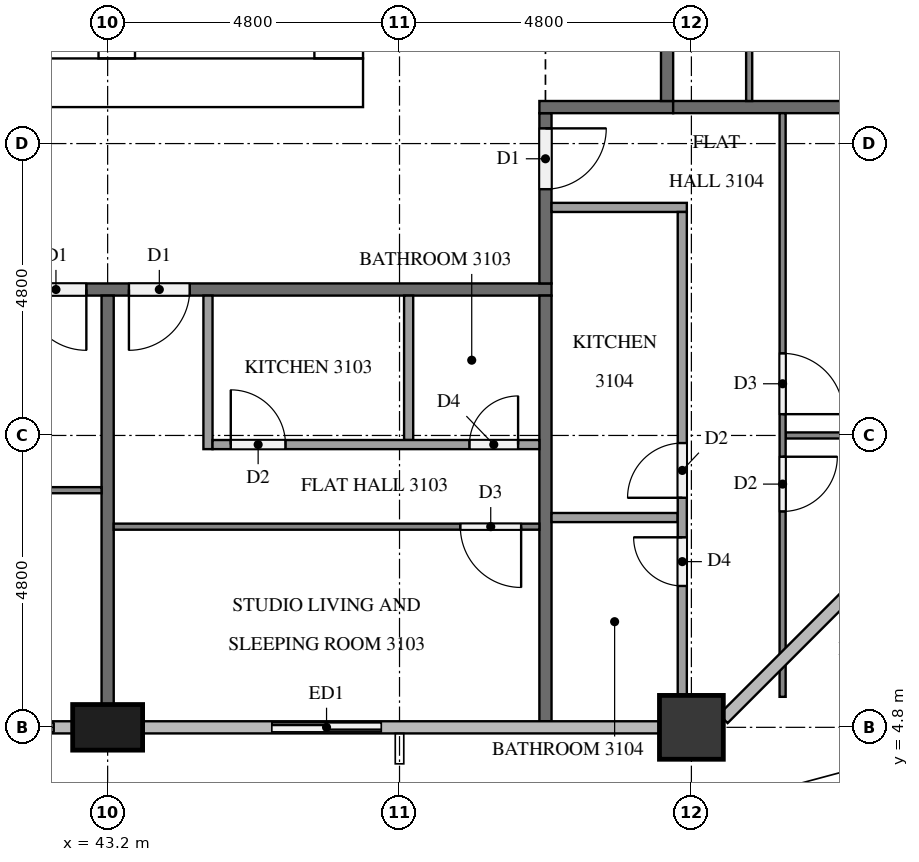
"""IFC4 building model, lengths in metres.
Left out: names, types, materials, properties, quantities, classifications, styles, units other than length and angle.
Written with IfcOpenShell. Run it as: python <this file> out.ifc"""

import sys

from ifc_helpers import new_model, si_unit, direction, frame, frame_2d, origin, origin_2d, place, context, subcontext, project, spatial, rectangle, extrude, element, fill, save


model = new_model("IFC4")
c1 = context("Model", 3, precision=1e-05, world=origin(), true_north=direction((0.0, 1.0)))
c2 = subcontext(c1, "Body", "Model", "MODEL_VIEW")
j1 = project(units=[si_unit("LENGTHUNIT", "METRE"), si_unit("PLANEANGLEUNIT", "RADIAN")], contexts=[c1])
p1 = place(None, origin())
s1 = spatial("IfcSite", under=j1, at=p1, CompositionType="ELEMENT")
p2 = place(p1, origin())
s2 = spatial("IfcBuilding", under=s1, at=p2, CompositionType="ELEMENT")
p3 = place(p2, frame((0.0, 0.0, 122.6)))
s3 = spatial("IfcBuildingStorey", under=s2, at=p3, CompositionType="ELEMENT", Elevation=122.6)
p4 = place(p3, frame((15.0, 15.4, 0.0), z_axis=(0.0, 0.0, 1.0), x_axis=(1.0, 0.0, 0.0)))
e1 = element("IfcWall", 1, at=p4, inside=s3, PredefinedType="SHEAR", context=c2, shape_type="SweptSolid", body=[
    extrude(rectangle(XDim=32.4, YDim=0.8, at=frame_2d((16.2, 0.0))), origin(), (0.0, 0.0, 1.0), 3.2),
])
p5 = place(p4, frame((15.3, 0.0, 0.0)))
e2 = element("IfcOpeningElement", 2, at=p5, cuts=e1, PredefinedType="OPENING", context=c2, shape_type="SweptSolid", body=[
    extrude(rectangle(XDim=1.8, YDim=2.1, at=frame_2d((0.9, 1.05))), frame((0.0, 0.41, 0.0), z_axis=(0.0, -1.0, 0.0), x_axis=(1.0, 0.0, 0.0)), (0.0, 0.0, 1.0), 0.82),
])
p6 = place(p3, frame((47.0, 15.8, 0.0), z_axis=(0.0, 0.0, 1.0), x_axis=(0.0, 1.0, 0.0)))
e3 = element("IfcWall", 3, at=p6, inside=s3, PredefinedType="SHEAR", context=c2, shape_type="SweptSolid", body=[
    extrude(rectangle(XDim=21.2, YDim=0.8, at=frame_2d((10.6, 0.0))), origin(), (0.0, 0.0, 1.0), 3.2),
])
p7 = place(p6, frame((10.3, 0.0, 0.0)))
e4 = element("IfcOpeningElement", 4, at=p7, cuts=e3, PredefinedType="OPENING", context=c2, shape_type="SweptSolid", body=[
    extrude(rectangle(XDim=1.2, YDim=2.1, at=frame_2d((0.6, 1.05))), frame((0.0, 0.41, 0.0), z_axis=(0.0, -1.0, 0.0), x_axis=(1.0, 0.0, 0.0)), (0.0, 0.0, 1.0), 0.82),
])
p8 = place(p3, frame((43.35, 15.8, 0.0), z_axis=(0.0, 0.0, 1.0), x_axis=(0.0, 1.0, 0.0)))
e5 = element("IfcWall", 5, at=p8, inside=s3, PredefinedType="SHEAR", context=c2, shape_type="SweptSolid", body=[
    extrude(rectangle(XDim=8.45, YDim=0.6, at=frame_2d((4.225, 0.0))), origin(), (0.0, 0.0, 1.0), 3.2),
])
p9 = place(p8, frame((0.4, 0.0, 0.0)))
e6 = element("IfcOpeningElement", 6, at=p9, cuts=e5, PredefinedType="OPENING", context=c2, shape_type="SweptSolid", body=[
    extrude(rectangle(XDim=1.2, YDim=2.1, at=frame_2d((0.6, 1.05))), frame((0.0, 0.31, 0.0), z_axis=(0.0, -1.0, 0.0), x_axis=(1.0, 0.0, 0.0)), (0.0, 0.0, 1.0), 0.62),
])
p10 = place(p3, frame((43.2, 4.8, 0.0), z_axis=(0.0, 0.0, 1.0), x_axis=(1.0, 0.0, 0.0)))
e7 = element("IfcColumn", 7, at=p10, inside=s3, PredefinedType="COLUMN", context=c2, shape_type="SweptSolid", body=[
    extrude(rectangle(XDim=1.15, YDim=0.75, at=origin_2d()), origin(), (0.0, 0.0, 1.0), 3.2),
])
p11 = place(p3, frame((52.8, 4.8, 0.0), z_axis=(0.0, 0.0, 1.0), x_axis=(1.0, 0.0, 0.0)))
e8 = element("IfcColumn", 8, at=p11, inside=s3, PredefinedType="COLUMN", context=c2, shape_type="SweptSolid", body=[
    extrude(rectangle(XDim=1.05, YDim=1.05, at=origin_2d()), origin(), (0.0, 0.0, 1.0), 3.2),
])
p12 = place(p3, frame((40.8, 4.8, 0.0), z_axis=(0.0, 0.0, 1.0), x_axis=(1.0, 0.0, 0.0)))
e9 = element("IfcWall", 9, at=p12, inside=s3, PredefinedType="SOLIDWALL", context=c2, shape_type="SweptSolid", body=[
    extrude(rectangle(XDim=1.825, YDim=0.15, at=frame_2d((0.913, 0.0))), origin(), (0.0, 0.0, 1.0), 3.2),
])
p13 = place(p12, frame((0.312, 0.0, 0.9)))
e10 = element("IfcOpeningElement", 10, at=p13, cuts=e9, PredefinedType="OPENING", context=c2, shape_type="SweptSolid", body=[
    extrude(rectangle(XDim=1.2, YDim=1.4, at=frame_2d((0.6, 0.7))), frame((0.0, 0.085, 0.0), z_axis=(0.0, -1.0, 0.0), x_axis=(1.0, 0.0, 0.0)), (0.0, 0.0, 1.0), 0.17),
])
p14 = place(p3, frame((45.6, 4.8, 0.0), z_axis=(0.0, 0.0, 1.0), x_axis=(1.0, 0.0, 0.0)))
e11 = element("IfcWall", 11, at=p14, inside=s3, PredefinedType="SOLIDWALL", context=c2, shape_type="SweptSolid", body=[
    extrude(rectangle(XDim=2.4, YDim=0.15, at=frame_2d((1.2, 0.0))), origin(), (0.0, 0.0, 1.0), 3.2),
])
p15 = place(p14, frame((0.3, 0.0, 0.0)))
e12 = element("IfcOpeningElement", 12, at=p15, cuts=e11, PredefinedType="OPENING", context=c2, shape_type="SweptSolid", body=[
    extrude(rectangle(XDim=1.8, YDim=2.4, at=frame_2d((0.9, 1.2))), frame((0.0, 0.085, 0.0), z_axis=(0.0, -1.0, 0.0), x_axis=(1.0, 0.0, 0.0)), (0.0, 0.0, 1.0), 0.17),
])
p16 = place(p3, frame((50.5, 12.0, 0.0), z_axis=(0.0, 0.0, 1.0), x_axis=(-1.0, 0.0, 0.0)))
e13 = element("IfcWall", 13, at=p16, inside=s3, PredefinedType="PARTITIONING", context=c2, shape_type="SweptSolid", body=[
    extrude(rectangle(XDim=38.6, YDim=0.2, at=frame_2d((19.3, 0.0))), origin(), (0.0, 0.0, 1.0), 3.2),
])
p17 = place(p16, frame((37.15, 0.0, 0.0)))
e14 = element("IfcOpeningElement", 14, at=p17, cuts=e13, PredefinedType="OPENING", context=c2, shape_type="SweptSolid", body=[
    extrude(rectangle(XDim=1.0, YDim=2.1, at=frame_2d((0.5, 1.05))), frame((0.0, 0.11, 0.0), z_axis=(0.0, -1.0, 0.0), x_axis=(1.0, 0.0, 0.0)), (0.0, 0.0, 1.0), 0.22),
])
p18 = place(p16, frame((7.65, 0.0, 0.0)))
e15 = element("IfcOpeningElement", 15, at=p18, cuts=e13, PredefinedType="OPENING", context=c2, shape_type="SweptSolid", body=[
    extrude(rectangle(XDim=1.0, YDim=2.1, at=frame_2d((0.5, 1.05))), frame((0.0, 0.11, 0.0), z_axis=(0.0, -1.0, 0.0), x_axis=(1.0, 0.0, 0.0)), (0.0, 0.0, 1.0), 0.22),
])
p19 = place(p16, frame((5.95, 0.0, 0.0)))
e16 = element("IfcOpeningElement", 16, at=p19, cuts=e13, PredefinedType="OPENING", context=c2, shape_type="SweptSolid", body=[
    extrude(rectangle(XDim=1.0, YDim=2.1, at=frame_2d((0.5, 1.05))), frame((0.0, 0.11, 0.0), z_axis=(0.0, -1.0, 0.0), x_axis=(1.0, 0.0, 0.0)), (0.0, 0.0, 1.0), 0.22),
])
p20 = place(p3, frame((50.4, 14.9, 0.0), z_axis=(0.0, 0.0, 1.0), x_axis=(0.0, -1.0, 0.0)))
e17 = element("IfcWall", 17, at=p20, inside=s3, PredefinedType="PARTITIONING", context=c2, shape_type="SweptSolid", body=[
    extrude(rectangle(XDim=2.8, YDim=0.2, at=frame_2d((1.4, 0.0))), origin(), (0.0, 0.0, 1.0), 3.2),
])
p21 = place(p20, frame((0.25, 0.0, 0.0)))
e18 = element("IfcOpeningElement", 18, at=p21, cuts=e17, PredefinedType="OPENING", context=c2, shape_type="SweptSolid", body=[
    extrude(rectangle(XDim=1.0, YDim=2.1, at=frame_2d((0.5, 1.05))), frame((0.0, 0.11, 0.0), z_axis=(0.0, -1.0, 0.0), x_axis=(1.0, 0.0, 0.0)), (0.0, 0.0, 1.0), 0.22),
])
p22 = place(p3, frame((50.3, 15.0, 0.0), z_axis=(0.0, 0.0, 1.0), x_axis=(1.0, 0.0, 0.0)))
e19 = element("IfcWall", 19, at=p22, inside=s3, PredefinedType="PARTITIONING", context=c2, shape_type="SweptSolid", body=[
    extrude(rectangle(XDim=2.2, YDim=0.2, at=frame_2d((1.1, 0.0))), origin(), (0.0, 0.0, 1.0), 3.2),
])
p23 = place(p3, frame((52.4, 37.7, 0.0), z_axis=(0.0, 0.0, 1.0), x_axis=(0.0, -1.0, 0.0)))
e20 = element("IfcWall", 20, at=p23, inside=s3, PredefinedType="PARTITIONING", context=c2, shape_type="SweptSolid", body=[
    extrude(rectangle(XDim=22.6, YDim=0.2, at=frame_2d((11.3, 0.0))), origin(), (0.0, 0.0, 1.0), 3.2),
])
p24 = place(p23, frame((0.25, 0.0, 0.0)))
e21 = element("IfcOpeningElement", 21, at=p24, cuts=e20, PredefinedType="OPENING", context=c2, shape_type="SweptSolid", body=[
    extrude(rectangle(XDim=1.0, YDim=2.1, at=frame_2d((0.5, 1.05))), frame((0.0, 0.11, 0.0), z_axis=(0.0, -1.0, 0.0), x_axis=(1.0, 0.0, 0.0)), (0.0, 0.0, 1.0), 0.22),
])
p25 = place(p3, frame((43.2, 11.9, 0.0), z_axis=(0.0, 0.0, 1.0), x_axis=(0.0, -1.0, 0.0)))
e22 = element("IfcWall", 22, at=p25, inside=s3, PredefinedType="PARTITIONING", context=c2, shape_type="SweptSolid", body=[
    extrude(rectangle(XDim=6.725, YDim=0.2, at=frame_2d((3.362, 0.0))), origin(), (0.0, 0.0, 1.0), 3.2),
])
p26 = place(p3, frame((50.4, 11.9, 0.0), z_axis=(0.0, 0.0, 1.0), x_axis=(0.0, -1.0, 0.0)))
e23 = element("IfcWall", 23, at=p26, inside=s3, PredefinedType="PARTITIONING", context=c2, shape_type="SweptSolid", body=[
    extrude(rectangle(XDim=7.0, YDim=0.2, at=frame_2d((3.5, 0.0))), origin(), (0.0, 0.0, 1.0), 3.2),
])
p27 = place(p3, frame((52.5, 15.0, 0.0), z_axis=(0.0, 0.0, 1.0), x_axis=(1.0, 0.0, 0.0)))
e24 = element("IfcWall", 24, at=p27, inside=s3, PredefinedType="PARTITIONING", context=c2, shape_type="SweptSolid", body=[
    extrude(rectangle(XDim=5.0, YDim=0.2, at=frame_2d((2.5, 0.0))), origin(), (0.0, 0.0, 1.0), 3.2),
])
p28 = place(p3, frame((43.1, 8.7, 0.0), z_axis=(0.0, 0.0, 1.0), x_axis=(-1.0, 0.0, 0.0)))
e25 = element("IfcWall", 25, at=p28, inside=s3, PredefinedType="PARTITIONING", context=c2, shape_type="SweptSolid", body=[
    extrude(rectangle(XDim=16.6, YDim=0.1, at=frame_2d((8.3, 0.0))), origin(), (0.0, 0.0, 1.0), 3.2),
])
p29 = place(p28, frame((3.45, 0.0, 0.0)))
e26 = element("IfcOpeningElement", 26, at=p29, cuts=e25, PredefinedType="OPENING", context=c2, shape_type="SweptSolid", body=[
    extrude(rectangle(XDim=0.9, YDim=2.1, at=frame_2d((0.45, 1.05))), frame((0.0, 0.06, 0.0), z_axis=(0.0, -1.0, 0.0), x_axis=(1.0, 0.0, 0.0)), (0.0, 0.0, 1.0), 0.12),
])
p30 = place(p28, frame((5.05, 0.0, 0.0)))
e27 = element("IfcOpeningElement", 27, at=p30, cuts=e25, PredefinedType="OPENING", context=c2, shape_type="SweptSolid", body=[
    extrude(rectangle(XDim=1.0, YDim=2.1, at=frame_2d((0.5, 1.05))), frame((0.0, 0.06, 0.0), z_axis=(0.0, -1.0, 0.0), x_axis=(1.0, 0.0, 0.0)), (0.0, 0.0, 1.0), 0.12),
])
p31 = place(p28, frame((15.4, 0.0, 0.0)))
e28 = element("IfcOpeningElement", 28, at=p31, cuts=e25, PredefinedType="OPENING", context=c2, shape_type="SweptSolid", body=[
    extrude(rectangle(XDim=0.9, YDim=2.1, at=frame_2d((0.45, 1.05))), frame((0.0, 0.06, 0.0), z_axis=(0.0, -1.0, 0.0), x_axis=(1.0, 0.0, 0.0)), (0.0, 0.0, 1.0), 0.12),
])
p32 = place(p3, frame((50.3, 8.1, 0.0), z_axis=(0.0, 0.0, 1.0), x_axis=(-1.0, 0.0, 0.0)))
e29 = element("IfcWall", 29, at=p32, inside=s3, PredefinedType="PARTITIONING", context=c2, shape_type="SweptSolid", body=[
    extrude(rectangle(XDim=7.0, YDim=0.1, at=frame_2d((3.5, 0.0))), origin(), (0.0, 0.0, 1.0), 3.2),
])
p33 = place(p32, frame((0.3, 0.0, 0.0)))
e30 = element("IfcOpeningElement", 30, at=p33, cuts=e29, PredefinedType="OPENING", context=c2, shape_type="SweptSolid", body=[
    extrude(rectangle(XDim=1.0, YDim=2.1, at=frame_2d((0.5, 1.05))), frame((0.0, 0.06, 0.0), z_axis=(0.0, -1.0, 0.0), x_axis=(1.0, 0.0, 0.0)), (0.0, 0.0, 1.0), 0.12),
])
p34 = place(p3, frame((48.15, 11.9, 0.0), z_axis=(0.0, 0.0, 1.0), x_axis=(0.0, -1.0, 0.0)))
e31 = element("IfcWall", 31, at=p34, inside=s3, PredefinedType="PARTITIONING", context=c2, shape_type="SweptSolid", body=[
    extrude(rectangle(XDim=2.375, YDim=0.15, at=frame_2d((1.188, 0.0))), origin(), (0.0, 0.0, 1.0), 3.2),
])
p35 = place(p3, frame((44.85, 11.9, 0.0), z_axis=(0.0, 0.0, 1.0), x_axis=(0.0, -1.0, 0.0)))
e32 = element("IfcWall", 32, at=p35, inside=s3, PredefinedType="PARTITIONING", context=c2, shape_type="SweptSolid", body=[
    extrude(rectangle(XDim=2.525, YDim=0.15, at=frame_2d((1.262, 0.0))), origin(), (0.0, 0.0, 1.0), 3.2),
])
p36 = place(p3, frame((44.925, 9.45, 0.0), z_axis=(0.0, 0.0, 1.0), x_axis=(1.0, 0.0, 0.0)))
e33 = element("IfcWall", 33, at=p36, inside=s3, PredefinedType="PARTITIONING", context=c2, shape_type="SweptSolid", body=[
    extrude(rectangle(XDim=5.375, YDim=0.15, at=frame_2d((2.688, 0.0))), origin(), (0.0, 0.0, 1.0), 3.2),
])
p37 = place(p36, frame((0.3, 0.0, 0.0)))
e34 = element("IfcOpeningElement", 34, at=p37, cuts=e33, PredefinedType="OPENING", context=c2, shape_type="SweptSolid", body=[
    extrude(rectangle(XDim=0.9, YDim=2.1, at=frame_2d((0.45, 1.05))), frame((0.0, 0.085, 0.0), z_axis=(0.0, -1.0, 0.0), x_axis=(1.0, 0.0, 0.0)), (0.0, 0.0, 1.0), 0.17),
])
p38 = place(p36, frame((4.225, 0.0, 0.0)))
e35 = element("IfcOpeningElement", 35, at=p38, cuts=e33, PredefinedType="OPENING", context=c2, shape_type="SweptSolid", body=[
    extrude(rectangle(XDim=0.8, YDim=2.1, at=frame_2d((0.4, 1.05))), frame((0.0, 0.085, 0.0), z_axis=(0.0, -1.0, 0.0), x_axis=(1.0, 0.0, 0.0)), (0.0, 0.0, 1.0), 0.17),
])
p39 = place(p3, frame((54.35, 9.6, 0.0), z_axis=(0.0, 0.0, 1.0), x_axis=(1.0, 0.0, 0.0)))
e36 = element("IfcWall", 36, at=p39, inside=s3, PredefinedType="PARTITIONING", context=c2, shape_type="SweptSolid", body=[
    extrude(rectangle(XDim=2.725, YDim=0.1, at=frame_2d((1.362, 0.0))), origin(), (0.0, 0.0, 1.0), 3.2),
])
p40 = place(p3, frame((54.3, 14.9, 0.0), z_axis=(0.0, 0.0, 1.0), x_axis=(0.0, -1.0, 0.0)))
e37 = element("IfcWall", 37, at=p40, inside=s3, PredefinedType="PARTITIONING", context=c2, shape_type="SweptSolid", body=[
    extrude(rectangle(XDim=9.598, YDim=0.1, at=frame_2d((4.799, 0.0))), origin(), (0.0, 0.0, 1.0), 3.2),
])
p41 = place(p40, frame((3.95, 0.0, 0.0)))
e38 = element("IfcOpeningElement", 38, at=p41, cuts=e37, PredefinedType="OPENING", context=c2, shape_type="SweptSolid", body=[
    extrude(rectangle(XDim=1.0, YDim=2.1, at=frame_2d((0.5, 1.05))), frame((0.0, 0.06, 0.0), z_axis=(0.0, -1.0, 0.0), x_axis=(1.0, 0.0, 0.0)), (0.0, 0.0, 1.0), 0.12),
])
p42 = place(p40, frame((5.65, 0.0, 0.0)))
e39 = element("IfcOpeningElement", 39, at=p42, cuts=e37, PredefinedType="OPENING", context=c2, shape_type="SweptSolid", body=[
    extrude(rectangle(XDim=0.9, YDim=2.1, at=frame_2d((0.45, 1.05))), frame((0.0, 0.06, 0.0), z_axis=(0.0, -1.0, 0.0), x_axis=(1.0, 0.0, 0.0)), (0.0, 0.0, 1.0), 0.12),
])
p43 = place(p3, frame((50.5, 8.25, 0.0), z_axis=(0.0, 0.0, 1.0), x_axis=(1.0, 0.0, 0.0)))
e40 = element("IfcWall", 40, at=p43, inside=s3, PredefinedType="PARTITIONING", context=c2, shape_type="SweptSolid", body=[
    extrude(rectangle(XDim=2.075, YDim=0.15, at=frame_2d((1.038, 0.0))), origin(), (0.0, 0.0, 1.0), 3.2),
])
p44 = place(p3, frame((50.5, 13.35, 0.0), z_axis=(0.0, 0.0, 1.0), x_axis=(1.0, 0.0, 0.0)))
e41 = element("IfcWall", 41, at=p44, inside=s3, PredefinedType="PARTITIONING", context=c2, shape_type="SweptSolid", body=[
    extrude(rectangle(XDim=2.225, YDim=0.15, at=frame_2d((1.113, 0.0))), origin(), (0.0, 0.0, 1.0), 3.2),
])
p45 = place(p3, frame((52.65, 5.325, 0.0), z_axis=(0.0, 0.0, 1.0), x_axis=(0.0, 1.0, 0.0)))
e42 = element("IfcWall", 42, at=p45, inside=s3, PredefinedType="PARTITIONING", context=c2, shape_type="SweptSolid", body=[
    extrude(rectangle(XDim=7.95, YDim=0.15, at=frame_2d((3.975, 0.0))), origin(), (0.0, 0.0, 1.0), 3.2),
])
p46 = place(p45, frame((3.25, 0.0, 0.0)))
e43 = element("IfcOpeningElement", 43, at=p46, cuts=e42, PredefinedType="OPENING", context=c2, shape_type="SweptSolid", body=[
    extrude(rectangle(XDim=0.9, YDim=2.1, at=frame_2d((0.45, 1.05))), frame((0.0, 0.085, 0.0), z_axis=(0.0, -1.0, 0.0), x_axis=(1.0, 0.0, 0.0)), (0.0, 0.0, 1.0), 0.17),
])
p47 = place(p45, frame((1.8, 0.0, 0.0)))
e44 = element("IfcOpeningElement", 44, at=p47, cuts=e42, PredefinedType="OPENING", context=c2, shape_type="SweptSolid", body=[
    extrude(rectangle(XDim=0.8, YDim=2.1, at=frame_2d((0.4, 1.05))), frame((0.0, 0.085, 0.0), z_axis=(0.0, -1.0, 0.0), x_axis=(1.0, 0.0, 0.0)), (0.0, 0.0, 1.0), 0.17),
])
p48 = place(p3, frame((53.75, 37.7, 0.0), z_axis=(0.0, 0.0, 1.0), x_axis=(0.0, -1.0, 0.0)))
e45 = element("IfcWall", 45, at=p48, inside=s3, PredefinedType="PARTITIONING", context=c2, shape_type="SweptSolid", body=[
    extrude(rectangle(XDim=22.6, YDim=0.1, at=frame_2d((11.3, 0.0))), origin(), (0.0, 0.0, 1.0), 3.2),
])
p49 = place(p48, frame((2.85, 0.0, 0.0)))
e46 = element("IfcOpeningElement", 46, at=p49, cuts=e45, PredefinedType="OPENING", context=c2, shape_type="SweptSolid", body=[
    extrude(rectangle(XDim=0.9, YDim=2.1, at=frame_2d((0.45, 1.05))), frame((0.0, 0.06, 0.0), z_axis=(0.0, -1.0, 0.0), x_axis=(1.0, 0.0, 0.0)), (0.0, 0.0, 1.0), 0.12),
])
p50 = place(p48, frame((4.45, 0.0, 0.0)))
e47 = element("IfcOpeningElement", 47, at=p50, cuts=e45, PredefinedType="OPENING", context=c2, shape_type="SweptSolid", body=[
    extrude(rectangle(XDim=0.8, YDim=2.1, at=frame_2d((0.4, 1.05))), frame((0.0, 0.06, 0.0), z_axis=(0.0, -1.0, 0.0), x_axis=(1.0, 0.0, 0.0)), (0.0, 0.0, 1.0), 0.12),
])
p51 = place(p48, frame((7.65, 0.0, 0.0)))
e48 = element("IfcOpeningElement", 48, at=p51, cuts=e45, PredefinedType="OPENING", context=c2, shape_type="SweptSolid", body=[
    extrude(rectangle(XDim=0.9, YDim=2.1, at=frame_2d((0.45, 1.05))), frame((0.0, 0.06, 0.0), z_axis=(0.0, -1.0, 0.0), x_axis=(1.0, 0.0, 0.0)), (0.0, 0.0, 1.0), 0.12),
])
p52 = place(p48, frame((9.25, 0.0, 0.0)))
e49 = element("IfcOpeningElement", 49, at=p52, cuts=e45, PredefinedType="OPENING", context=c2, shape_type="SweptSolid", body=[
    extrude(rectangle(XDim=0.9, YDim=2.1, at=frame_2d((0.45, 1.05))), frame((0.0, 0.06, 0.0), z_axis=(0.0, -1.0, 0.0), x_axis=(1.0, 0.0, 0.0)), (0.0, 0.0, 1.0), 0.12),
])
p53 = place(p48, frame((17.15, 0.0, 0.0)))
e50 = element("IfcOpeningElement", 50, at=p53, cuts=e45, PredefinedType="OPENING", context=c2, shape_type="SweptSolid", body=[
    extrude(rectangle(XDim=1.0, YDim=2.1, at=frame_2d((0.5, 1.05))), frame((0.0, 0.06, 0.0), z_axis=(0.0, -1.0, 0.0), x_axis=(1.0, 0.0, 0.0)), (0.0, 0.0, 1.0), 0.12),
])
p54 = place(p48, frame((18.85, 0.0, 0.0)))
e51 = element("IfcOpeningElement", 51, at=p54, cuts=e45, PredefinedType="OPENING", context=c2, shape_type="SweptSolid", body=[
    extrude(rectangle(XDim=0.9, YDim=2.1, at=frame_2d((0.45, 1.05))), frame((0.0, 0.06, 0.0), z_axis=(0.0, -1.0, 0.0), x_axis=(1.0, 0.0, 0.0)), (0.0, 0.0, 1.0), 0.12),
])
p55 = place(p13, origin())
e52 = element("IfcWindow", 52, at=p55, inside=s3, PartitioningType="SINGLE_PANEL", PredefinedType="WINDOW", context=c2, shape_type="SweptSolid", body=[
    extrude(rectangle(XDim=1.2, YDim=1.4, at=frame_2d((0.6, 0.7))), frame((0.0, 0.03, 0.0), z_axis=(0.0, -1.0, 0.0), x_axis=(1.0, 0.0, 0.0)), (0.0, 0.0, 1.0), 0.06),
])
fill(e10, e52)
p56 = place(p15, origin())
e53 = element("IfcDoor", 53, at=p56, inside=s3, OperationType="SLIDING_TO_RIGHT", PredefinedType="DOOR", context=c2, shape_type="SweptSolid", body=[
    extrude(rectangle(XDim=1.8, YDim=2.4, at=frame_2d((0.9, 1.2))), frame((0.0, 0.025, 0.0), z_axis=(0.0, -1.0, 0.0), x_axis=(1.0, 0.0, 0.0)), (0.0, 0.0, 1.0), 0.05),
])
fill(e12, e53)
p57 = place(p18, origin())
e54 = element("IfcDoor", 54, at=p57, inside=s3, OperationType="SINGLE_SWING_LEFT", PredefinedType="DOOR", context=c2, shape_type="SweptSolid", body=[
    extrude(rectangle(XDim=1.0, YDim=2.1, at=frame_2d((0.5, 1.05))), frame((0.0, 0.025, 0.0), z_axis=(0.0, -1.0, 0.0), x_axis=(1.0, 0.0, 0.0)), (0.0, 0.0, 1.0), 0.05),
])
fill(e15, e54)
p58 = place(p19, origin())
e55 = element("IfcDoor", 55, at=p58, inside=s3, OperationType="SINGLE_SWING_RIGHT", PredefinedType="DOOR", context=c2, shape_type="SweptSolid", body=[
    extrude(rectangle(XDim=1.0, YDim=2.1, at=frame_2d((0.5, 1.05))), frame((0.0, 0.025, 0.0), z_axis=(0.0, -1.0, 0.0), x_axis=(1.0, 0.0, 0.0)), (0.0, 0.0, 1.0), 0.05),
])
fill(e16, e55)
p59 = place(p21, origin())
e56 = element("IfcDoor", 56, at=p59, inside=s3, OperationType="SINGLE_SWING_LEFT", PredefinedType="DOOR", context=c2, shape_type="SweptSolid", body=[
    extrude(rectangle(XDim=1.0, YDim=2.1, at=frame_2d((0.5, 1.05))), frame((0.0, 0.025, 0.0), z_axis=(0.0, -1.0, 0.0), x_axis=(1.0, 0.0, 0.0)), (0.0, 0.0, 1.0), 0.05),
])
fill(e18, e56)
p60 = place(p33, origin())
e57 = element("IfcDoor", 57, at=p60, inside=s3, OperationType="SINGLE_SWING_LEFT", PredefinedType="DOOR", context=c2, shape_type="SweptSolid", body=[
    extrude(rectangle(XDim=1.0, YDim=2.1, at=frame_2d((0.5, 1.05))), frame((0.0, 0.025, 0.0), z_axis=(0.0, -1.0, 0.0), x_axis=(1.0, 0.0, 0.0)), (0.0, 0.0, 1.0), 0.05),
])
fill(e30, e57)
p61 = place(p37, origin())
e58 = element("IfcDoor", 58, at=p61, inside=s3, OperationType="SINGLE_SWING_LEFT", PredefinedType="DOOR", context=c2, shape_type="SweptSolid", body=[
    extrude(rectangle(XDim=0.9, YDim=2.1, at=frame_2d((0.45, 1.05))), frame((0.0, 0.025, 0.0), z_axis=(0.0, -1.0, 0.0), x_axis=(1.0, 0.0, 0.0)), (0.0, 0.0, 1.0), 0.05),
])
fill(e34, e58)
p62 = place(p38, origin())
e59 = element("IfcDoor", 59, at=p62, inside=s3, OperationType="SINGLE_SWING_RIGHT", PredefinedType="DOOR", context=c2, shape_type="SweptSolid", body=[
    extrude(rectangle(XDim=0.8, YDim=2.1, at=frame_2d((0.4, 1.05))), frame((0.0, 0.025, 0.0), z_axis=(0.0, -1.0, 0.0), x_axis=(1.0, 0.0, 0.0)), (0.0, 0.0, 1.0), 0.05),
])
fill(e35, e59)
p63 = place(p41, origin())
e60 = element("IfcDoor", 60, at=p63, inside=s3, OperationType="SINGLE_SWING_RIGHT", PredefinedType="DOOR", context=c2, shape_type="SweptSolid", body=[
    extrude(rectangle(XDim=1.0, YDim=2.1, at=frame_2d((0.5, 1.05))), frame((0.0, 0.025, 0.0), z_axis=(0.0, -1.0, 0.0), x_axis=(1.0, 0.0, 0.0)), (0.0, 0.0, 1.0), 0.05),
])
fill(e38, e60)
p64 = place(p42, origin())
e61 = element("IfcDoor", 61, at=p64, inside=s3, OperationType="SINGLE_SWING_LEFT", PredefinedType="DOOR", context=c2, shape_type="SweptSolid", body=[
    extrude(rectangle(XDim=0.9, YDim=2.1, at=frame_2d((0.45, 1.05))), frame((0.0, 0.025, 0.0), z_axis=(0.0, -1.0, 0.0), x_axis=(1.0, 0.0, 0.0)), (0.0, 0.0, 1.0), 0.05),
])
fill(e39, e61)
p65 = place(p46, origin())
e62 = element("IfcDoor", 62, at=p65, inside=s3, OperationType="SINGLE_SWING_LEFT", PredefinedType="DOOR", context=c2, shape_type="SweptSolid", body=[
    extrude(rectangle(XDim=0.9, YDim=2.1, at=frame_2d((0.45, 1.05))), frame((0.0, 0.025, 0.0), z_axis=(0.0, -1.0, 0.0), x_axis=(1.0, 0.0, 0.0)), (0.0, 0.0, 1.0), 0.05),
])
fill(e43, e62)
p66 = place(p47, origin())
e63 = element("IfcDoor", 63, at=p66, inside=s3, OperationType="SINGLE_SWING_RIGHT", PredefinedType="DOOR", context=c2, shape_type="SweptSolid", body=[
    extrude(rectangle(XDim=0.8, YDim=2.1, at=frame_2d((0.4, 1.05))), frame((0.0, 0.025, 0.0), z_axis=(0.0, -1.0, 0.0), x_axis=(1.0, 0.0, 0.0)), (0.0, 0.0, 1.0), 0.05),
])
fill(e44, e63)
save(model, sys.argv[1])
